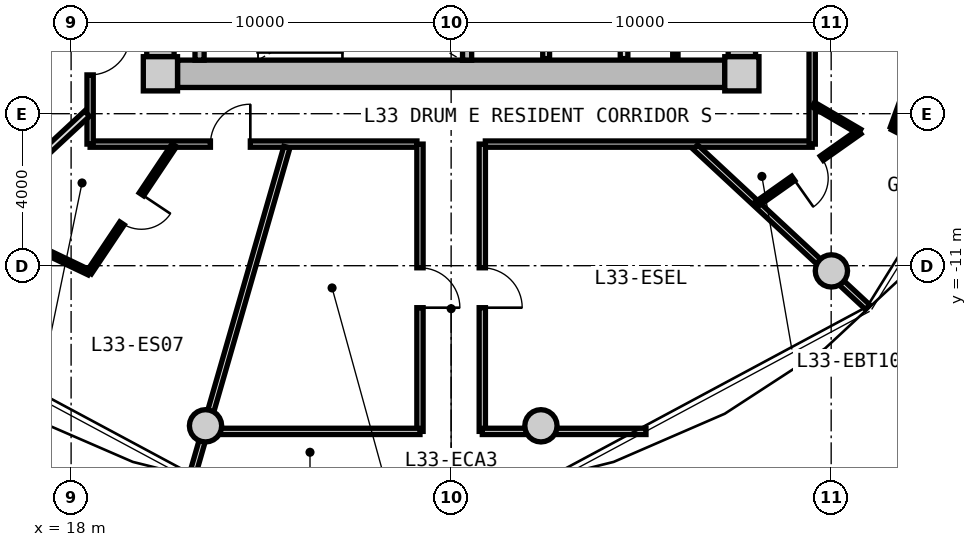
"""IFC4 building model, lengths in metres.
Left out: names, types, materials, properties, quantities, classifications, styles, units other than length and angle.
Written with IfcOpenShell. Run it as: python <this file> out.ifc"""

import sys

from ifc_helpers import new_model, si_unit, direction, frame, frame_2d, origin, origin_2d, place, context, subcontext, project, spatial, rectangle, circle, extrude, source, transform, mapped, element, fill, save


model = new_model("IFC4")
c1 = context("Model", 3, precision=1e-05, world=origin(), true_north=direction((0.0, 1.0)))
c2 = subcontext(c1, "Body", "Model", "MODEL_VIEW")
j1 = project(units=[si_unit("LENGTHUNIT", "METRE"), si_unit("PLANEANGLEUNIT", "RADIAN")], contexts=[c1])
p1 = place(None, origin())
s1 = spatial("IfcSite", under=j1, at=p1, CompositionType="ELEMENT")
p2 = place(p1, origin())
s2 = spatial("IfcBuilding", under=s1, at=p2, CompositionType="ELEMENT")
p3 = place(p2, frame((0.0, 0.0, 108.45)))
s3 = spatial("IfcBuildingStorey", under=s2, at=p3, CompositionType="ELEMENT", Elevation=108.45)
m1 = source(origin(), c2, "Body", "SweptSolid", [
    extrude(rectangle(XDim=0.9, YDim=0.9, at=origin_2d()), origin(), (0.0, 0.0, 1.0), 3.05),
])
for number, where, z_axis, x_axis in (
    (1, (20.35, -5.95, 0.0), (0.0, 0.0, 1.0), (1.0, 0.0, 0.0)),
    (2, (35.65, -5.95, 0.0), (0.0, 0.0, 1.0), (1.0, 0.0, 0.0)),
):
    element("IfcColumn", number, at=place(p3, frame(where, z_axis=z_axis, x_axis=x_axis)), inside=s3, PredefinedType="COLUMN", context=c2, shape_type="MappedRepresentation", body=[
        mapped(m1, transform((0.0, 0.0, 0.0), x_axis=(1.0, 0.0, 0.0), y_axis=(0.0, 1.0, 0.0), z_axis=(0.0, 0.0, 1.0), scale=1.0)),
    ])
m2 = source(origin(), c2, "Body", "SweptSolid", [
    extrude(rectangle(XDim=14.4, YDim=0.72, at=frame_2d((7.2, 0.0))), origin(), (0.0, 0.0, 1.0), 2.79),
])
p4 = place(p3, frame((35.2, -5.95, 0.0), z_axis=(0.0, 0.0, 1.0), x_axis=(-1.0, 0.0, 0.0)))
e3 = element("IfcWall", 3, at=p4, inside=s3, PredefinedType="SHEAR", context=c2, shape_type="MappedRepresentation", body=[
    mapped(m2, transform((0.0, 0.0, 0.0), x_axis=(1.0, 0.0, 0.0), y_axis=(0.0, 1.0, 0.0), z_axis=(0.0, 0.0, 1.0), scale=1.0)),
])
m3 = source(origin(), c2, "Body", "SweptSolid", [
    extrude(rectangle(XDim=11.0, YDim=0.72, at=frame_2d((5.5, 0.0))), origin(), (0.0, 0.0, 1.0), 2.79),
])
p5 = place(p3, frame((20.35, -5.5, 0.0), z_axis=(0.0, 0.0, 1.0), x_axis=(0.0, 1.0, 0.0)))
e4 = element("IfcWall", 4, at=p5, inside=s3, PredefinedType="SHEAR", context=c2, shape_type="MappedRepresentation", body=[
    mapped(m3, transform((0.0, 0.0, 0.0), x_axis=(1.0, 0.0, 0.0), y_axis=(0.0, 1.0, 0.0), z_axis=(0.0, 0.0, 1.0), scale=1.0)),
])
p6 = place(p5, frame((3.8, 0.0, 0.0)))
e5 = element("IfcOpeningElement", 5, at=p6, cuts=e4, PredefinedType="OPENING", context=c2, shape_type="SweptSolid", body=[
    extrude(rectangle(XDim=1.2, YDim=2.15, at=frame_2d((0.6, 1.075))), frame((0.0, 0.37, 0.0), z_axis=(0.0, -1.0, 0.0), x_axis=(1.0, 0.0, 0.0)), (0.0, 0.0, 1.0), 0.74),
])
p7 = place(p3, frame((35.65, 5.5, 0.0), z_axis=(0.0, 0.0, 1.0), x_axis=(0.0, -1.0, 0.0)))
e6 = element("IfcWall", 6, at=p7, inside=s3, PredefinedType="SHEAR", context=c2, shape_type="MappedRepresentation", body=[
    mapped(m3, transform((0.0, 0.0, 0.0), x_axis=(1.0, 0.0, 0.0), y_axis=(0.0, 1.0, 0.0), z_axis=(0.0, 0.0, 1.0), scale=1.0)),
])
p8 = place(p7, frame((5.65, 0.0, 0.0)))
e7 = element("IfcOpeningElement", 7, at=p8, cuts=e6, PredefinedType="OPENING", context=c2, shape_type="SweptSolid", body=[
    extrude(rectangle(XDim=1.2, YDim=2.15, at=frame_2d((0.6, 1.075))), frame((0.0, 0.37, 0.0), z_axis=(0.0, -1.0, 0.0), x_axis=(1.0, 0.0, 0.0)), (0.0, 0.0, 1.0), 0.74),
])
m4 = source(origin(), c2, "Body", "SweptSolid", [
    extrude(circle(Radius=0.425, at=origin_2d()), origin(), (0.0, 0.0, 1.0), 3.05),
])
for number, where, z_axis, x_axis in (
    (8, (21.537, -15.213, 0.0), (0.0, 0.0, 1.0), (1.0, 0.0, 0.0)),
    (9, (30.363, -15.213, 0.0), (0.0, 0.0, 1.0), (1.0, 0.0, 0.0)),
    (10, (38.006, -11.137, 0.0), (0.0, 0.0, 1.0), (1.0, 0.0, 0.0)),
):
    element("IfcColumn", number, at=place(p3, frame(where, z_axis=z_axis, x_axis=x_axis)), inside=s3, PredefinedType="COLUMN", context=c2, shape_type="MappedRepresentation", body=[
        mapped(m4, transform((0.0, 0.0, 0.0), x_axis=(1.0, 0.0, 0.0), y_axis=(0.0, 1.0, 0.0), z_axis=(0.0, 0.0, 1.0), scale=1.0)),
    ])
m5 = source(origin(), c2, "Body", "SweptSolid", [
    extrude(rectangle(XDim=3.14, YDim=0.24, at=frame_2d((1.57, 0.0))), origin(), (0.0, 0.0, 1.0), 2.79),
])
for number, where, z_axis, x_axis in (
    (11, (21.38, -5.59, 0.0), (0.0, 0.0, 1.0), (0.0, 1.0, 0.0)),
    (12, (28.42, -5.59, 0.0), (0.0, 0.0, 1.0), (0.0, 1.0, 0.0)),
):
    element("IfcWall", number, at=place(p3, frame(where, z_axis=z_axis, x_axis=x_axis)), inside=s3, PredefinedType="PARTITIONING", context=c2, shape_type="MappedRepresentation", body=[
        mapped(m5, transform((0.0, 0.0, 0.0), x_axis=(1.0, 0.0, 0.0), y_axis=(0.0, 1.0, 0.0), z_axis=(0.0, 0.0, 1.0), scale=1.0)),
    ])
m6 = source(origin(), c2, "Body", "SweptSolid", [
    extrude(rectangle(XDim=3.8, YDim=0.2, at=frame_2d((1.9, 0.0))), origin(), (0.0, 0.0, 1.0), 2.775),
])
p9 = place(p3, frame((32.55, -5.55, 0.0), z_axis=(0.0, 0.0, 1.0), x_axis=(0.0, 1.0, 0.0)))
e13 = element("IfcWall", 13, at=p9, inside=s3, PredefinedType="PARTITIONING", context=c2, shape_type="MappedRepresentation", body=[
    mapped(m6, transform((0.0, 0.0, 0.0), x_axis=(1.0, 0.0, 0.0), y_axis=(0.0, 1.0, 0.0), z_axis=(0.0, 0.0, 1.0), scale=1.0)),
])
m7 = source(origin(), c2, "Body", "SweptSolid", [
    extrude(rectangle(XDim=3.22, YDim=0.18, at=frame_2d((1.61, 0.0))), origin(), (0.0, 0.0, 1.0), 2.775),
])
p10 = place(p3, frame((30.5, -5.55, 0.0), z_axis=(0.0, 0.0, 1.0), x_axis=(0.0, 1.0, 0.0)))
e14 = element("IfcWall", 14, at=p10, inside=s3, PredefinedType="PARTITIONING", context=c2, shape_type="MappedRepresentation", body=[
    mapped(m7, transform((0.0, 0.0, 0.0), x_axis=(1.0, 0.0, 0.0), y_axis=(0.0, 1.0, 0.0), z_axis=(0.0, 0.0, 1.0), scale=1.0)),
])
m8 = source(origin(), c2, "Body", "SweptSolid", [
    extrude(rectangle(XDim=3.8, YDim=0.14, at=frame_2d((1.9, 0.0))), origin(), (0.0, 0.0, 1.0), 2.775),
])
p11 = place(p3, frame((33.9, -5.55, 0.0), z_axis=(0.0, 0.0, 1.0), x_axis=(0.0, 1.0, 0.0)))
e15 = element("IfcWall", 15, at=p11, inside=s3, PredefinedType="PARTITIONING", context=c2, shape_type="MappedRepresentation", body=[
    mapped(m8, transform((0.0, 0.0, 0.0), x_axis=(1.0, 0.0, 0.0), y_axis=(0.0, 1.0, 0.0), z_axis=(0.0, 0.0, 1.0), scale=1.0)),
])
m9 = source(origin(), c2, "Body", "SweptSolid", [
    extrude(rectangle(XDim=8.6, YDim=0.165, at=frame_2d((4.3, 0.0))), origin(), (0.0, 0.0, 1.0), 2.775),
])
p12 = place(p3, frame((37.5, -7.8, 0.0), z_axis=(0.0, 0.0, 1.0), x_axis=(-1.0, 0.0, 0.0)))
e16 = element("IfcWall", 16, at=p12, inside=s3, PredefinedType="PARTITIONING", context=c2, shape_type="MappedRepresentation", body=[
    mapped(m9, transform((0.0, 0.0, 0.0), x_axis=(1.0, 0.0, 0.0), y_axis=(0.0, 1.0, 0.0), z_axis=(0.0, 0.0, 1.0), scale=1.0)),
])
p13 = place(p3, frame((27.1, -7.8, 0.0), z_axis=(0.0, 0.0, 1.0), x_axis=(-1.0, 0.0, 0.0)))
e17 = element("IfcWall", 17, at=p13, inside=s3, PredefinedType="PARTITIONING", context=c2, shape_type="MappedRepresentation", body=[
    mapped(m9, transform((0.0, 0.0, 0.0), x_axis=(1.0, 0.0, 0.0), y_axis=(0.0, 1.0, 0.0), z_axis=(0.0, 0.0, 1.0), scale=1.0)),
])
p14 = place(p13, frame((4.384, 0.0, 0.0)))
e18 = element("IfcOpeningElement", 18, at=p14, cuts=e17, PredefinedType="OPENING", context=c2, shape_type="SweptSolid", body=[
    extrude(rectangle(XDim=1.05, YDim=2.15, at=frame_2d((0.525, 1.075))), frame((0.0, 0.093, 0.0), z_axis=(0.0, -1.0, 0.0), x_axis=(1.0, 0.0, 0.0)), (0.0, 0.0, 1.0), 0.185),
])
m10 = source(origin(), c2, "Body", "SweptSolid", [
    extrude(rectangle(XDim=15.6, YDim=0.165, at=frame_2d((7.8, 0.0))), origin(), (0.0, 0.0, 1.0), 2.775),
])
p15 = place(p3, frame((18.5, -7.8, 0.0), z_axis=(0.0, 0.0, 1.0), x_axis=(0.0, 1.0, 0.0)))
e19 = element("IfcWall", 19, at=p15, inside=s3, PredefinedType="PARTITIONING", context=c2, shape_type="MappedRepresentation", body=[
    mapped(m10, transform((0.0, 0.0, 0.0), x_axis=(1.0, 0.0, 0.0), y_axis=(0.0, 1.0, 0.0), z_axis=(0.0, 0.0, 1.0), scale=1.0)),
])
p16 = place(p15, frame((10.383, 0.0, 0.0)))
e20 = element("IfcOpeningElement", 20, at=p16, cuts=e19, PredefinedType="OPENING", context=c2, shape_type="SweptSolid", body=[
    extrude(rectangle(XDim=1.05, YDim=2.15, at=frame_2d((0.525, 1.075))), frame((0.0, 0.093, 0.0), z_axis=(0.0, -1.0, 0.0), x_axis=(1.0, 0.0, 0.0)), (0.0, 0.0, 1.0), 0.185),
])
p17 = place(p15, frame((6.419, 0.0, 0.0)))
e21 = element("IfcOpeningElement", 21, at=p17, cuts=e19, PredefinedType="OPENING", context=c2, shape_type="SweptSolid", body=[
    extrude(rectangle(XDim=1.05, YDim=2.15, at=frame_2d((0.525, 1.075))), frame((0.0, 0.093, 0.0), z_axis=(0.0, -1.0, 0.0), x_axis=(1.0, 0.0, 0.0)), (0.0, 0.0, 1.0), 0.185),
])
p18 = place(p15, frame((1.821, 0.0, 0.0)))
e22 = element("IfcOpeningElement", 22, at=p18, cuts=e19, PredefinedType="OPENING", context=c2, shape_type="SweptSolid", body=[
    extrude(rectangle(XDim=1.05, YDim=2.15, at=frame_2d((0.525, 1.075))), frame((0.0, 0.093, 0.0), z_axis=(0.0, -1.0, 0.0), x_axis=(1.0, 0.0, 0.0)), (0.0, 0.0, 1.0), 0.185),
])
p19 = place(p3, frame((37.5, 7.8, 0.0), z_axis=(0.0, 0.0, 1.0), x_axis=(0.0, -1.0, 0.0)))
e23 = element("IfcWall", 23, at=p19, inside=s3, PredefinedType="PARTITIONING", context=c2, shape_type="MappedRepresentation", body=[
    mapped(m10, transform((0.0, 0.0, 0.0), x_axis=(1.0, 0.0, 0.0), y_axis=(0.0, 1.0, 0.0), z_axis=(0.0, 0.0, 1.0), scale=1.0)),
])
p20 = place(p19, frame((6.87, 0.0, 0.0)))
e24 = element("IfcOpeningElement", 24, at=p20, cuts=e23, PredefinedType="OPENING", context=c2, shape_type="SweptSolid", body=[
    extrude(rectangle(XDim=1.05, YDim=2.15, at=frame_2d((0.525, 1.075))), frame((0.0, 0.093, 0.0), z_axis=(0.0, -1.0, 0.0), x_axis=(1.0, 0.0, 0.0)), (0.0, 0.0, 1.0), 0.185),
])
m11 = source(origin(), c2, "Body", "SweptSolid", [
    extrude(rectangle(XDim=8.989, YDim=0.165, at=frame_2d((4.495, 0.0))), origin(), (0.0, 0.0, 1.0), 2.275),
])
p21 = place(p3, frame((23.678, -7.88, 0.0), z_axis=(0.0, 0.0, 1.0), x_axis=(-0.27702323008, -0.960863221274, 0.0)))
e25 = element("IfcWall", 25, at=p21, inside=s3, PredefinedType="PARTITIONING", context=c2, shape_type="MappedRepresentation", body=[
    mapped(m11, transform((0.0, 0.0, 0.0), x_axis=(1.0, 0.0, 0.0), y_axis=(0.0, 1.0, 0.0), z_axis=(0.0, 0.0, 1.0), scale=1.0)),
])
m12 = source(origin(), c2, "Body", "SweptSolid", [
    extrude(rectangle(XDim=6.187, YDim=0.165, at=frame_2d((3.093, 0.0))), origin(), (0.0, 0.0, 1.0), 2.275),
])
p22 = place(p3, frame((34.429, -7.88, 0.0), z_axis=(0.0, 0.0, 1.0), x_axis=(0.732501077882, -0.680765870841, 0.0)))
e26 = element("IfcWall", 26, at=p22, inside=s3, PredefinedType="PARTITIONING", context=c2, shape_type="MappedRepresentation", body=[
    mapped(m12, transform((0.0, 0.0, 0.0), x_axis=(1.0, 0.0, 0.0), y_axis=(0.0, 1.0, 0.0), z_axis=(0.0, 0.0, 1.0), scale=1.0)),
])
m13 = source(origin(), c2, "Body", "SweptSolid", [
    extrude(rectangle(XDim=7.56, YDim=0.165, at=frame_2d((3.78, 0.0))), origin(), (0.0, 0.0, 1.0), 2.775),
])
p23 = place(p3, frame((27.18, -15.36, 0.0), z_axis=(0.0, 0.0, 1.0), x_axis=(0.0, 1.0, 0.0)))
e27 = element("IfcWall", 27, at=p23, inside=s3, PredefinedType="PARTITIONING", context=c2, shape_type="MappedRepresentation", body=[
    mapped(m13, transform((0.0, 0.0, 0.0), x_axis=(1.0, 0.0, 0.0), y_axis=(0.0, 1.0, 0.0), z_axis=(0.0, 0.0, 1.0), scale=1.0)),
])
p24 = place(p23, frame((3.255, 0.0, 0.0)))
e28 = element("IfcOpeningElement", 28, at=p24, cuts=e27, PredefinedType="OPENING", context=c2, shape_type="SweptSolid", body=[
    extrude(rectangle(XDim=1.05, YDim=2.15, at=frame_2d((0.525, 1.075))), frame((0.0, 0.093, 0.0), z_axis=(0.0, -1.0, 0.0), x_axis=(1.0, 0.0, 0.0)), (0.0, 0.0, 1.0), 0.185),
])
m14 = source(origin(), c2, "Body", "SweptSolid", [
    extrude(rectangle(XDim=5.814, YDim=0.165, at=frame_2d((2.907, 0.0))), origin(), (0.0, 0.0, 1.0), 2.275),
])
p25 = place(p3, frame((21.366, -15.36, 0.0), z_axis=(0.0, 0.0, 1.0), x_axis=(1.0, 0.0, 0.0)))
e29 = element("IfcWall", 29, at=p25, inside=s3, PredefinedType="PARTITIONING", context=c2, shape_type="MappedRepresentation", body=[
    mapped(m14, transform((0.0, 0.0, 0.0), x_axis=(1.0, 0.0, 0.0), y_axis=(0.0, 1.0, 0.0), z_axis=(0.0, 0.0, 1.0), scale=1.0)),
])
p26 = place(p3, frame((28.82, -15.36, 0.0), z_axis=(0.0, 0.0, 1.0), x_axis=(0.0, 1.0, 0.0)))
e30 = element("IfcWall", 30, at=p26, inside=s3, PredefinedType="PARTITIONING", context=c2, shape_type="MappedRepresentation", body=[
    mapped(m13, transform((0.0, 0.0, 0.0), x_axis=(1.0, 0.0, 0.0), y_axis=(0.0, 1.0, 0.0), z_axis=(0.0, 0.0, 1.0), scale=1.0)),
])
p27 = place(p26, frame((3.255, 0.0, 0.0)))
e31 = element("IfcOpeningElement", 31, at=p27, cuts=e30, PredefinedType="OPENING", context=c2, shape_type="SweptSolid", body=[
    extrude(rectangle(XDim=1.05, YDim=2.15, at=frame_2d((0.525, 1.075))), frame((0.0, 0.093, 0.0), z_axis=(0.0, -1.0, 0.0), x_axis=(1.0, 0.0, 0.0)), (0.0, 0.0, 1.0), 0.185),
])
m15 = source(origin(), c2, "Body", "SweptSolid", [
    extrude(rectangle(XDim=4.307, YDim=0.165, at=frame_2d((2.153, 0.0))), origin(), (0.0, 0.0, 1.0), 2.275),
])
p28 = place(p3, frame((28.82, -15.36, 0.0), z_axis=(0.0, 0.0, 1.0), x_axis=(1.0, 0.0, 0.0)))
e32 = element("IfcWall", 32, at=p28, inside=s3, PredefinedType="PARTITIONING", context=c2, shape_type="MappedRepresentation", body=[
    mapped(m15, transform((0.0, 0.0, 0.0), x_axis=(1.0, 0.0, 0.0), y_axis=(0.0, 1.0, 0.0), z_axis=(0.0, 0.0, 1.0), scale=1.0)),
])
m16 = source(origin(), c2, "Body", "SweptSolid", [
    extrude(rectangle(XDim=7.482, YDim=0.19, at=frame_2d((3.741, 0.0))), origin(), (0.0, 0.0, 1.0), 2.275),
])
p29 = place(p3, frame((18.42, -6.998, 0.0), z_axis=(0.0, 0.0, 1.0), x_axis=(-0.732508698043, -0.680757671489, 0.0)))
e33 = element("IfcWall", 33, at=p29, inside=s3, PredefinedType="PARTITIONING", context=c2, shape_type="MappedRepresentation", body=[
    mapped(m16, transform((0.0, 0.0, 0.0), x_axis=(1.0, 0.0, 0.0), y_axis=(0.0, 1.0, 0.0), z_axis=(0.0, 0.0, 1.0), scale=1.0)),
])
m17 = source(origin(), c2, "Body", "SweptSolid", [
    extrude(rectangle(XDim=4.941, YDim=0.14, at=frame_2d((2.471, 0.0))), origin(), (0.0, 0.0, 1.0), 2.775),
])
p30 = place(p3, frame((18.47, -3.717, 0.0), z_axis=(0.0, 0.0, 1.0), x_axis=(-0.89555083256, -0.444959218694, 0.0)))
e34 = element("IfcWall", 34, at=p30, inside=s3, PredefinedType="PARTITIONING", context=c2, shape_type="MappedRepresentation", body=[
    mapped(m17, transform((0.0, 0.0, 0.0), x_axis=(1.0, 0.0, 0.0), y_axis=(0.0, 1.0, 0.0), z_axis=(0.0, 0.0, 1.0), scale=1.0)),
])
p31 = place(p30, frame((2.011, 0.0, 0.0)))
e35 = element("IfcOpeningElement", 35, at=p31, cuts=e34, PredefinedType="OPENING", context=c2, shape_type="SweptSolid", body=[
    extrude(rectangle(XDim=0.92, YDim=2.1, at=frame_2d((0.46, 1.05))), frame((0.0, 0.08, 0.0), z_axis=(0.0, -1.0, 0.0), x_axis=(1.0, 0.0, 0.0)), (0.0, 0.0, 1.0), 0.16),
])
m18 = source(origin(), c2, "Body", "SweptSolid", [
    extrude(rectangle(XDim=4.027, YDim=0.14, at=frame_2d((2.014, 0.0))), origin(), (0.0, 0.0, 1.0), 2.775),
])
p32 = place(p3, frame((20.714, -7.83, 0.0), z_axis=(0.0, 0.0, 1.0), x_axis=(-0.555832825922, -0.831294093343, 0.0)))
e36 = element("IfcWall", 36, at=p32, inside=s3, PredefinedType="PARTITIONING", context=c2, shape_type="MappedRepresentation", body=[
    mapped(m18, transform((0.0, 0.0, 0.0), x_axis=(1.0, 0.0, 0.0), y_axis=(0.0, 1.0, 0.0), z_axis=(0.0, 0.0, 1.0), scale=1.0)),
])
p33 = place(p32, frame((1.554, 0.0, 0.0)))
e37 = element("IfcOpeningElement", 37, at=p33, cuts=e36, PredefinedType="OPENING", context=c2, shape_type="SweptSolid", body=[
    extrude(rectangle(XDim=0.92, YDim=2.1, at=frame_2d((0.46, 1.05))), frame((0.0, 0.08, 0.0), z_axis=(0.0, -1.0, 0.0), x_axis=(1.0, 0.0, 0.0)), (0.0, 0.0, 1.0), 0.16),
])
m19 = source(origin(), c2, "Body", "SweptSolid", [
    extrude(rectangle(XDim=3.291, YDim=0.14, at=frame_2d((1.646, 0.0))), origin(), (0.0, 0.0, 1.0), 2.775),
])
p34 = place(p3, frame((18.476, -11.178, 0.0), z_axis=(0.0, 0.0, 1.0), x_axis=(-0.902381393443, 0.430938302739, 0.0)))
e38 = element("IfcWall", 38, at=p34, inside=s3, PredefinedType="PARTITIONING", context=c2, shape_type="MappedRepresentation", body=[
    mapped(m19, transform((0.0, 0.0, 0.0), x_axis=(1.0, 0.0, 0.0), y_axis=(0.0, 1.0, 0.0), z_axis=(0.0, 0.0, 1.0), scale=1.0)),
])
m20 = source(origin(), c2, "Body", "SweptSolid", [
    extrude(rectangle(XDim=1.407, YDim=0.14, at=frame_2d((0.704, 0.0))), origin(), (0.0, 0.0, 1.0), 2.775),
])
p35 = place(p3, frame((37.53, -6.762, 0.0), z_axis=(0.0, 0.0, 1.0), x_axis=(0.863539718977, -0.504280828258, 0.0)))
e39 = element("IfcWall", 39, at=p35, inside=s3, PredefinedType="PARTITIONING", context=c2, shape_type="MappedRepresentation", body=[
    mapped(m20, transform((0.0, 0.0, 0.0), x_axis=(1.0, 0.0, 0.0), y_axis=(0.0, 1.0, 0.0), z_axis=(0.0, 0.0, 1.0), scale=1.0)),
])
m21 = source(origin(), c2, "Body", "SweptSolid", [
    extrude(rectangle(XDim=3.347, YDim=0.14, at=frame_2d((1.673, 0.0))), origin(), (0.0, 0.0, 1.0), 2.775),
])
p36 = place(p3, frame((38.745, -7.472, 0.0), z_axis=(0.0, 0.0, 1.0), x_axis=(-0.81705680263, -0.576557179537, 0.0)))
e40 = element("IfcWall", 40, at=p36, inside=s3, PredefinedType="PARTITIONING", context=c2, shape_type="MappedRepresentation", body=[
    mapped(m21, transform((0.0, 0.0, 0.0), x_axis=(1.0, 0.0, 0.0), y_axis=(0.0, 1.0, 0.0), z_axis=(0.0, 0.0, 1.0), scale=1.0)),
])
p37 = place(p36, frame((1.214, 0.0, 0.0)))
e41 = element("IfcOpeningElement", 41, at=p37, cuts=e40, PredefinedType="OPENING", context=c2, shape_type="SweptSolid", body=[
    extrude(rectangle(XDim=0.92, YDim=2.1, at=frame_2d((0.46, 1.05))), frame((0.0, 0.08, 0.0), z_axis=(0.0, -1.0, 0.0), x_axis=(1.0, 0.0, 0.0)), (0.0, 0.0, 1.0), 0.16),
])
m22 = source(origin(), c2, "Body", "SweptSolid", [
    extrude(rectangle(XDim=1.945, YDim=0.115, at=frame_2d((0.973, 0.0))), origin(), (0.0, 0.0, 1.0), 2.775),
])
p38 = place(p3, frame((39.611, -7.37, 0.0), z_axis=(0.0, 0.0, 1.0), x_axis=(0.889684148329, -0.456576517368, 0.0)))
e42 = element("IfcWall", 42, at=p38, inside=s3, PredefinedType="PARTITIONING", context=c2, shape_type="MappedRepresentation", body=[
    mapped(m22, transform((0.0, 0.0, 0.0), x_axis=(1.0, 0.0, 0.0), y_axis=(0.0, 1.0, 0.0), z_axis=(0.0, 0.0, 1.0), scale=1.0)),
])
m23 = source(origin(), c2, "Body", "SweptSolid", [
    extrude(rectangle(XDim=3.852, YDim=0.115, at=frame_2d((1.926, 0.0))), origin(), (0.0, 0.0, 1.0), 2.775),
])
p39 = place(p3, frame((39.611, -7.37, 0.0), z_axis=(0.0, 0.0, 1.0), x_axis=(0.340653649518, 0.940188859257, 0.0)))
e43 = element("IfcWall", 43, at=p39, inside=s3, PredefinedType="PARTITIONING", context=c2, shape_type="MappedRepresentation", body=[
    mapped(m23, transform((0.0, 0.0, 0.0), x_axis=(1.0, 0.0, 0.0), y_axis=(0.0, 1.0, 0.0), z_axis=(0.0, 0.0, 1.0), scale=1.0)),
])
p40 = place(p39, frame((1.451, 0.0, 0.0)))
e44 = element("IfcOpeningElement", 44, at=p40, cuts=e43, PredefinedType="OPENING", context=c2, shape_type="SweptSolid", body=[
    extrude(rectangle(XDim=0.95, YDim=2.1, at=frame_2d((0.475, 1.05))), frame((0.0, 0.067, 0.0), z_axis=(0.0, -1.0, 0.0), x_axis=(1.0, 0.0, 0.0)), (0.0, 0.0, 1.0), 0.135),
])
m24 = source(origin(), c2, "Body", "SweptSolid", [
    extrude(rectangle(XDim=1.05, YDim=2.15, at=frame_2d((0.525, 1.075))), frame((0.0, 0.025, 0.0), z_axis=(0.0, -1.0, 0.0), x_axis=(1.0, 0.0, 0.0)), (0.0, 0.0, 1.0), 0.05),
])
p41 = place(p24, frame((1.05, 0.0, 0.0), z_axis=(0.0, 0.0, 1.0), x_axis=(-1.0, 0.0, 0.0)))
e45 = element("IfcDoor", 45, at=p41, inside=s3, OperationType="SINGLE_SWING_RIGHT", PredefinedType="DOOR", context=c2, shape_type="MappedRepresentation", body=[
    mapped(m24, transform((0.0, 0.0, 0.0), x_axis=(1.0, 0.0, 0.0), y_axis=(0.0, 1.0, 0.0), z_axis=(0.0, 0.0, 1.0), scale=1.0)),
])
fill(e28, e45)
p42 = place(p27, frame((1.05, 0.0, 0.0), z_axis=(0.0, 0.0, 1.0), x_axis=(-1.0, 0.0, 0.0)))
e46 = element("IfcDoor", 46, at=p42, inside=s3, OperationType="SINGLE_SWING_RIGHT", PredefinedType="DOOR", context=c2, shape_type="MappedRepresentation", body=[
    mapped(m24, transform((0.0, 0.0, 0.0), x_axis=(1.0, 0.0, 0.0), y_axis=(0.0, 1.0, 0.0), z_axis=(0.0, 0.0, 1.0), scale=1.0)),
])
fill(e31, e46)
p43 = place(p18, frame((1.05, 0.0, 0.0), z_axis=(0.0, 0.0, 1.0), x_axis=(-1.0, 0.0, 0.0)))
e47 = element("IfcDoor", 47, at=p43, inside=s3, OperationType="SINGLE_SWING_LEFT", PredefinedType="DOOR", context=c2, shape_type="MappedRepresentation", body=[
    mapped(m24, transform((0.0, 0.0, 0.0), x_axis=(1.0, 0.0, 0.0), y_axis=(0.0, 1.0, 0.0), z_axis=(0.0, 0.0, 1.0), scale=1.0)),
])
fill(e22, e47)
p44 = place(p14, frame((1.05, 0.0, 0.0), z_axis=(0.0, 0.0, 1.0), x_axis=(-1.0, 0.0, 0.0)))
e48 = element("IfcDoor", 48, at=p44, inside=s3, OperationType="SINGLE_SWING_RIGHT", PredefinedType="DOOR", context=c2, shape_type="MappedRepresentation", body=[
    mapped(m24, transform((0.0, 0.0, 0.0), x_axis=(1.0, 0.0, 0.0), y_axis=(0.0, 1.0, 0.0), z_axis=(0.0, 0.0, 1.0), scale=1.0)),
])
fill(e18, e48)
m25 = source(origin(), c2, "Body", "SweptSolid", [
    extrude(rectangle(XDim=0.92, YDim=2.1, at=frame_2d((0.46, 1.05))), frame((0.0, 0.025, 0.0), z_axis=(0.0, -1.0, 0.0), x_axis=(1.0, 0.0, 0.0)), (0.0, 0.0, 1.0), 0.05),
])
p45 = place(p33, origin())
e49 = element("IfcDoor", 49, at=p45, inside=s3, OperationType="SINGLE_SWING_LEFT", PredefinedType="DOOR", context=c2, shape_type="MappedRepresentation", body=[
    mapped(m25, transform((0.0, 0.0, 0.0), x_axis=(1.0, 0.0, 0.0), y_axis=(0.0, 1.0, 0.0), z_axis=(0.0, 0.0, 1.0), scale=1.0)),
])
fill(e37, e49)
p46 = place(p37, origin())
e50 = element("IfcDoor", 50, at=p46, inside=s3, OperationType="SINGLE_SWING_RIGHT", PredefinedType="DOOR", context=c2, shape_type="MappedRepresentation", body=[
    mapped(m25, transform((0.0, 0.0, 0.0), x_axis=(1.0, 0.0, 0.0), y_axis=(0.0, 1.0, 0.0), z_axis=(0.0, 0.0, 1.0), scale=1.0)),
])
fill(e41, e50)
save(model, sys.argv[1])
